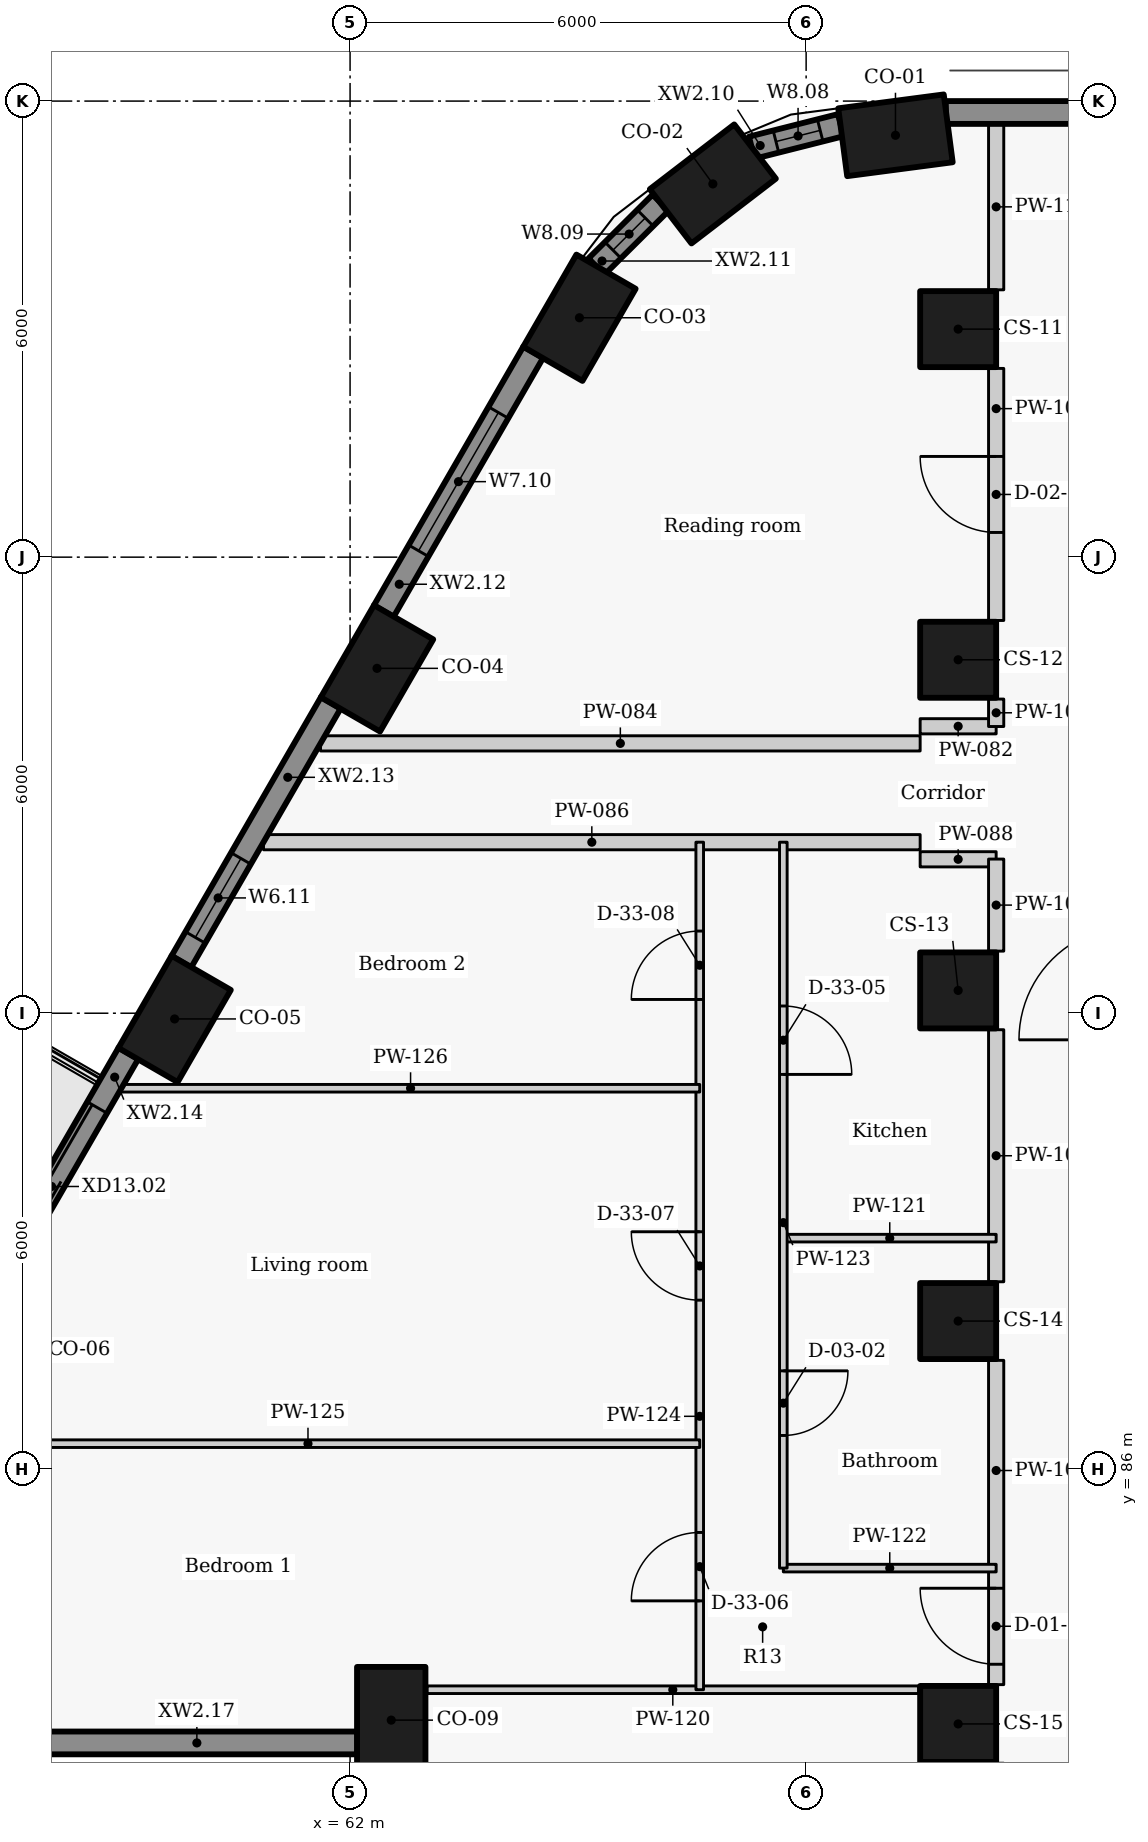
"""IFC4 building model, lengths in metres.
Left out: names, types, materials, properties, quantities, classifications, styles, units other than length and angle.
Written with IfcOpenShell. Run it as: python <this file> out.ifc"""

import sys

from ifc_helpers import new_model, si_unit, direction, frame, frame_2d, origin, origin_2d, place, context, subcontext, project, spatial, rectangle, extrude, element, fill, save


model = new_model("IFC4")
c1 = context("Model", 3, precision=1e-05, world=origin(), true_north=direction((0.0, 1.0)))
c2 = subcontext(c1, "Body", "Model", "MODEL_VIEW")
j1 = project(units=[si_unit("LENGTHUNIT", "METRE"), si_unit("PLANEANGLEUNIT", "RADIAN")], contexts=[c1])
p1 = place(None, origin())
s1 = spatial("IfcSite", under=j1, at=p1, CompositionType="ELEMENT")
p2 = place(p1, origin())
s2 = spatial("IfcBuilding", under=s1, at=p2, CompositionType="ELEMENT")
p3 = place(p2, frame((0.0, 0.0, 117.3)))
s3 = spatial("IfcBuildingStorey", under=s2, at=p3, CompositionType="ELEMENT", Elevation=117.3)
for number, where, z_axis, x_axis in (
    (1, (69.175, 103.55, 0.0), (0.0, 0.0, 1.0), (-0.991, -0.131, 0.0)),
    (2, (66.773, 102.91, 0.0), (0.0, 0.0, 1.0), (-0.793, -0.609, 0.0)),
    (3, (65.018, 101.149, 0.0), (0.0, 0.0, 1.0), (-0.5, -0.866, 0.0)),
    (4, (62.354, 96.537, 0.0), (0.0, 0.0, 1.0), (-0.5, -0.866, 0.0)),
    (5, (59.692, 91.925, 0.0), (0.0, 0.0, 1.0), (-0.5, -0.866, 0.0)),
    (6, (62.542, 82.7, 0.0), (0.0, 0.0, 1.0), (0.0, -1.0, 0.0)),
):
    element("IfcColumn", number, at=place(p3, frame(where, z_axis=z_axis, x_axis=x_axis)), inside=s3, PredefinedType="COLUMN", context=c2, shape_type="SweptSolid", body=[
        extrude(rectangle(XDim=1.4, YDim=0.9, at=origin_2d()), origin(), (0.0, 0.0, 1.0), 3.3),
    ])
for number, where, z_axis, x_axis in (
    (7, (70.0, 101.0, 0.0), (0.0, 0.0, 1.0), (0.0, -1.0, 0.0)),
    (8, (70.0, 96.65, 0.0), (0.0, 0.0, 1.0), (0.0, -1.0, 0.0)),
    (9, (70.0, 92.3, 0.0), (0.0, 0.0, 1.0), (0.0, -1.0, 0.0)),
    (10, (70.0, 87.95, 0.0), (0.0, 0.0, 1.0), (0.0, -1.0, 0.0)),
    (11, (70.0, 82.65, 0.0), (0.0, 0.0, 1.0), (0.0, -1.0, 0.0)),
):
    element("IfcColumn", number, at=place(p3, frame(where, z_axis=z_axis, x_axis=x_axis)), inside=s3, PredefinedType="COLUMN", context=c2, shape_type="SweptSolid", body=[
        extrude(rectangle(XDim=1.0, YDim=1.0, at=origin_2d()), origin(), (0.0, 0.0, 1.0), 3.3),
    ])
p4 = place(p3, frame((90.129, 103.85, 0.0), z_axis=(0.0, 0.0, 1.0), x_axis=(-1.0, 0.0, 0.0)))
e12 = element("IfcWall", 12, at=p4, inside=s3, PredefinedType="SOLIDWALL", context=c2, shape_type="SweptSolid", body=[
    extrude(rectangle(XDim=20.291, YDim=0.3, at=frame_2d((10.146, 0.0))), origin(), (0.0, 0.0, 1.0), 2.05),
])
p5 = place(p3, frame((68.456, 103.683, 0.0), z_axis=(0.0, 0.0, 1.0), x_axis=(-0.969485113966, -0.245150186208, 0.0)))
e13 = element("IfcWall", 13, at=p5, inside=s3, PredefinedType="SOLIDWALL", context=c2, shape_type="SweptSolid", body=[
    extrude(rectangle(XDim=1.208, YDim=0.3, at=frame_2d((0.604, 0.0))), origin(), (0.0, 0.0, 1.0), 2.05),
])
p6 = place(p5, frame((0.28, 0.0, 0.9)))
e14 = element("IfcOpeningElement", 14, at=p6, cuts=e13, PredefinedType="OPENING", context=c2, shape_type="SweptSolid", body=[
    extrude(rectangle(XDim=0.6, YDim=1.1, at=frame_2d((0.3, 0.55))), frame((0.0, 0.16, 0.0), z_axis=(0.0, -1.0, 0.0), x_axis=(1.0, 0.0, 0.0)), (0.0, 0.0, 1.0), 0.32),
])
p7 = place(p3, frame((66.085, 102.663, 0.0), z_axis=(0.0, 0.0, 1.0), x_axis=(-0.708951665509, -0.705257070842, 0.0)))
e15 = element("IfcWall", 15, at=p7, inside=s3, PredefinedType="SOLIDWALL", context=c2, shape_type="SweptSolid", body=[
    extrude(rectangle(XDim=1.189, YDim=0.3, at=frame_2d((0.595, 0.0))), origin(), (0.0, 0.0, 1.0), 2.05),
])
p8 = place(p7, frame((0.284, 0.0, 0.9)))
e16 = element("IfcOpeningElement", 16, at=p8, cuts=e15, PredefinedType="OPENING", context=c2, shape_type="SweptSolid", body=[
    extrude(rectangle(XDim=0.6, YDim=1.1, at=frame_2d((0.3, 0.55))), frame((0.0, 0.16, 0.0), z_axis=(0.0, -1.0, 0.0), x_axis=(1.0, 0.0, 0.0)), (0.0, 0.0, 1.0), 0.32),
])
p9 = place(p3, frame((64.41, 100.697, 0.0), z_axis=(0.0, 0.0, 1.0), x_axis=(-0.500003583557, -0.866023334807, 0.0)))
e17 = element("IfcWall", 17, at=p9, inside=s3, PredefinedType="SOLIDWALL", context=c2, shape_type="SweptSolid", body=[
    extrude(rectangle(XDim=3.934, YDim=0.3, at=frame_2d((1.967, 0.0))), origin(), (0.0, 0.0, 1.0), 2.05),
])
p10 = place(p9, frame((0.917, 0.0, 0.9)))
e18 = element("IfcOpeningElement", 18, at=p10, cuts=e17, PredefinedType="OPENING", context=c2, shape_type="SweptSolid", body=[
    extrude(rectangle(XDim=2.1, YDim=1.1, at=frame_2d((1.05, 0.55))), frame((0.0, 0.16, 0.0), z_axis=(0.0, -1.0, 0.0), x_axis=(1.0, 0.0, 0.0)), (0.0, 0.0, 1.0), 0.32),
])
p11 = place(p3, frame((61.747, 96.084, 0.0), z_axis=(0.0, 0.0, 1.0), x_axis=(-0.499957037901, -0.866050206543, 0.0)))
e19 = element("IfcWall", 19, at=p11, inside=s3, PredefinedType="SOLIDWALL", context=c2, shape_type="SweptSolid", body=[
    extrude(rectangle(XDim=3.934, YDim=0.3, at=frame_2d((1.967, 0.0))), origin(), (0.0, 0.0, 1.0), 2.05),
])
p12 = place(p11, frame((2.365, 0.0, 0.9)))
e20 = element("IfcOpeningElement", 20, at=p12, cuts=e19, PredefinedType="OPENING", context=c2, shape_type="SweptSolid", body=[
    extrude(rectangle(XDim=1.2, YDim=1.1, at=frame_2d((0.6, 0.55))), frame((0.0, 0.16, 0.0), z_axis=(0.0, -1.0, 0.0), x_axis=(1.0, 0.0, 0.0)), (0.0, 0.0, 1.0), 0.32),
])
p13 = place(p3, frame((59.084, 91.472, 0.0), z_axis=(0.0, 0.0, 1.0), x_axis=(-0.500009139881, -0.866020126807, 0.0)))
e21 = element("IfcWall", 21, at=p13, inside=s3, PredefinedType="SOLIDWALL", context=c2, shape_type="SweptSolid", body=[
    extrude(rectangle(XDim=3.637, YDim=0.3, at=frame_2d((1.818, 0.0))), origin(), (0.0, 0.0, 1.0), 2.05),
])
p14 = place(p13, frame((0.823, 0.0, 0.0)))
e22 = element("IfcOpeningElement", 22, at=p14, cuts=e21, PredefinedType="OPENING", context=c2, shape_type="SweptSolid", body=[
    extrude(rectangle(XDim=2.4, YDim=2.0, at=frame_2d((1.2, 1.0))), frame((0.0, 0.16, 0.0), z_axis=(0.0, -1.0, 0.0), x_axis=(1.0, 0.0, 0.0)), (0.0, 0.0, 1.0), 0.32),
])
p15 = place(p3, frame((57.873, 82.4, 0.0), z_axis=(0.0, 0.0, 1.0), x_axis=(1.0, 0.0, 0.0)))
e23 = element("IfcWall", 23, at=p15, inside=s3, PredefinedType="SOLIDWALL", context=c2, shape_type="SweptSolid", body=[
    extrude(rectangle(XDim=4.223, YDim=0.3, at=frame_2d((2.111, 0.0))), origin(), (0.0, 0.0, 1.0), 2.05),
])
p16 = place(p3, frame((69.5, 95.775, 0.0), z_axis=(0.0, 0.0, 1.0), x_axis=(1.0, 0.0, 0.0)))
e24 = element("IfcWall", 24, at=p16, inside=s3, PredefinedType="PARTITIONING", context=c2, shape_type="SweptSolid", body=[
    extrude(rectangle(XDim=1.0, YDim=0.2, at=frame_2d((0.5, 0.0))), origin(), (0.0, 0.0, 1.0), 2.43),
])
p17 = place(p3, frame((61.611, 95.55, 0.0), z_axis=(0.0, 0.0, 1.0), x_axis=(1.0, 0.0, 0.0)))
e25 = element("IfcWall", 25, at=p17, inside=s3, PredefinedType="PARTITIONING", context=c2, shape_type="SweptSolid", body=[
    extrude(rectangle(XDim=7.889, YDim=0.2, at=frame_2d((3.944, 0.0))), origin(), (0.0, 0.0, 1.0), 2.03),
])
p18 = place(p3, frame((60.861, 94.25, 0.0), z_axis=(0.0, 0.0, 1.0), x_axis=(1.0, 0.0, 0.0)))
e26 = element("IfcWall", 26, at=p18, inside=s3, PredefinedType="PARTITIONING", context=c2, shape_type="SweptSolid", body=[
    extrude(rectangle(XDim=8.639, YDim=0.2, at=frame_2d((4.32, 0.0))), origin(), (0.0, 0.0, 1.0), 2.03),
])
p19 = place(p3, frame((69.5, 94.025, 0.0), z_axis=(0.0, 0.0, 1.0), x_axis=(1.0, 0.0, 0.0)))
e27 = element("IfcWall", 27, at=p19, inside=s3, PredefinedType="PARTITIONING", context=c2, shape_type="SweptSolid", body=[
    extrude(rectangle(XDim=1.0, YDim=0.2, at=frame_2d((0.5, 0.0))), origin(), (0.0, 0.0, 1.0), 2.43),
])
p20 = place(p3, frame((70.5, 83.167, 0.0), z_axis=(0.0, 0.0, 1.0), x_axis=(0.0, 1.0, 0.0)))
e28 = element("IfcWall", 28, at=p20, inside=s3, PredefinedType="PARTITIONING", context=c2, shape_type="SweptSolid", body=[
    extrude(rectangle(XDim=4.266, YDim=0.2, at=frame_2d((2.133, 0.0))), origin(), (0.0, 0.0, 1.0), 2.95),
])
p21 = place(p20, frame((0.268, 0.0, 0.0)))
e29 = element("IfcOpeningElement", 29, at=p21, cuts=e28, PredefinedType="OPENING", context=c2, shape_type="SweptSolid", body=[
    extrude(rectangle(XDim=1.0, YDim=2.1, at=frame_2d((0.5, 1.05))), frame((0.0, 0.11, 0.0), z_axis=(0.0, -1.0, 0.0), x_axis=(1.0, 0.0, 0.0)), (0.0, 0.0, 1.0), 0.22),
])
p22 = place(p3, frame((70.5, 88.467, 0.0), z_axis=(0.0, 0.0, 1.0), x_axis=(0.0, 1.0, 0.0)))
e30 = element("IfcWall", 30, at=p22, inside=s3, PredefinedType="PARTITIONING", context=c2, shape_type="SweptSolid", body=[
    extrude(rectangle(XDim=3.316, YDim=0.2, at=frame_2d((1.658, 0.0))), origin(), (0.0, 0.0, 1.0), 2.95),
])
p23 = place(p3, frame((70.5, 92.817, 0.0), z_axis=(0.0, 0.0, 1.0), x_axis=(0.0, 1.0, 0.0)))
e31 = element("IfcWall", 31, at=p23, inside=s3, PredefinedType="PARTITIONING", context=c2, shape_type="SweptSolid", body=[
    extrude(rectangle(XDim=1.211, YDim=0.2, at=frame_2d((0.605, 0.0))), origin(), (0.0, 0.0, 1.0), 2.95),
])
p24 = place(p3, frame((70.5, 95.772, 0.0), z_axis=(0.0, 0.0, 1.0), x_axis=(0.0, 1.0, 0.0)))
e32 = element("IfcWall", 32, at=p24, inside=s3, PredefinedType="PARTITIONING", context=c2, shape_type="SweptSolid", body=[
    extrude(rectangle(XDim=0.361, YDim=0.2, at=frame_2d((0.181, 0.0))), origin(), (0.0, 0.0, 1.0), 2.95),
])
p25 = place(p3, frame((70.5, 97.167, 0.0), z_axis=(0.0, 0.0, 1.0), x_axis=(0.0, 1.0, 0.0)))
e33 = element("IfcWall", 33, at=p25, inside=s3, PredefinedType="PARTITIONING", context=c2, shape_type="SweptSolid", body=[
    extrude(rectangle(XDim=3.316, YDim=0.2, at=frame_2d((1.658, 0.0))), origin(), (0.0, 0.0, 1.0), 2.95),
])
p26 = place(p25, frame((1.158, 0.0, 0.0)))
e34 = element("IfcOpeningElement", 34, at=p26, cuts=e33, PredefinedType="OPENING", context=c2, shape_type="SweptSolid", body=[
    extrude(rectangle(XDim=1.0, YDim=2.1, at=frame_2d((0.5, 1.05))), frame((0.0, 0.11, 0.0), z_axis=(0.0, -1.0, 0.0), x_axis=(1.0, 0.0, 0.0)), (0.0, 0.0, 1.0), 0.22),
])
p27 = place(p3, frame((70.5, 101.517, 0.0), z_axis=(0.0, 0.0, 1.0), x_axis=(0.0, 1.0, 0.0)))
e35 = element("IfcWall", 35, at=p27, inside=s3, PredefinedType="PARTITIONING", context=c2, shape_type="SweptSolid", body=[
    extrude(rectangle(XDim=2.183, YDim=0.2, at=frame_2d((1.091, 0.0))), origin(), (0.0, 0.0, 1.0), 2.95),
])
p28 = place(p3, frame((63.012, 83.1, 0.0), z_axis=(0.0, 0.0, 1.0), x_axis=(1.0, 0.0, 0.0)))
e36 = element("IfcWall", 36, at=p28, inside=s3, PredefinedType="PARTITIONING", context=c2, shape_type="SweptSolid", body=[
    extrude(rectangle(XDim=6.468, YDim=0.1, at=frame_2d((3.234, 0.0))), origin(), (0.0, 0.0, 1.0), 2.95),
])
for number, where, z_axis, x_axis in (
    (37, (67.7, 89.041, 0.0), (0.0, 0.0, 1.0), (1.0, 0.0, 0.0)),
    (38, (67.7, 84.7, 0.0), (0.0, 0.0, 1.0), (1.0, 0.0, 0.0)),
):
    element("IfcWall", number, at=place(p3, frame(where, z_axis=z_axis, x_axis=x_axis)), inside=s3, PredefinedType="PARTITIONING", context=c2, shape_type="SweptSolid", body=[
        extrude(rectangle(XDim=2.8, YDim=0.1, at=frame_2d((1.4, 0.0))), origin(), (0.0, 0.0, 1.0), 2.43),
    ])
p29 = place(p3, frame((67.7, 94.25, 0.0), z_axis=(0.0, 0.0, 1.0), x_axis=(0.0, -1.0, 0.0)))
e39 = element("IfcWall", 39, at=p29, inside=s3, PredefinedType="PARTITIONING", context=c2, shape_type="SweptSolid", body=[
    extrude(rectangle(XDim=9.55, YDim=0.1, at=frame_2d((4.775, 0.0))), origin(), (0.0, 0.0, 1.0), 2.95),
])
p30 = place(p29, frame((6.955, 0.0, 0.0)))
e40 = element("IfcOpeningElement", 40, at=p30, cuts=e39, PredefinedType="OPENING", context=c2, shape_type="SweptSolid", body=[
    extrude(rectangle(XDim=0.85, YDim=2.1, at=frame_2d((0.425, 1.05))), frame((0.0, 0.06, 0.0), z_axis=(0.0, -1.0, 0.0), x_axis=(1.0, 0.0, 0.0)), (0.0, 0.0, 1.0), 0.12),
])
p31 = place(p29, frame((2.155, 0.0, 0.0)))
e41 = element("IfcOpeningElement", 41, at=p31, cuts=e39, PredefinedType="OPENING", context=c2, shape_type="SweptSolid", body=[
    extrude(rectangle(XDim=0.9, YDim=2.1, at=frame_2d((0.45, 1.05))), frame((0.0, 0.06, 0.0), z_axis=(0.0, -1.0, 0.0), x_axis=(1.0, 0.0, 0.0)), (0.0, 0.0, 1.0), 0.12),
])
p32 = place(p3, frame((66.6, 83.1, 0.0), z_axis=(0.0, 0.0, 1.0), x_axis=(0.0, 1.0, 0.0)))
e42 = element("IfcWall", 42, at=p32, inside=s3, PredefinedType="PARTITIONING", context=c2, shape_type="SweptSolid", body=[
    extrude(rectangle(XDim=11.15, YDim=0.1, at=frame_2d((5.575, 0.0))), origin(), (0.0, 0.0, 1.0), 2.95),
])
p33 = place(p32, frame((1.169, 0.0, 0.0)))
e43 = element("IfcOpeningElement", 43, at=p33, cuts=e42, PredefinedType="OPENING", context=c2, shape_type="SweptSolid", body=[
    extrude(rectangle(XDim=0.9, YDim=2.1, at=frame_2d((0.45, 1.05))), frame((0.0, 0.06, 0.0), z_axis=(0.0, -1.0, 0.0), x_axis=(1.0, 0.0, 0.0)), (0.0, 0.0, 1.0), 0.12),
])
p34 = place(p32, frame((5.125, 0.0, 0.0)))
e44 = element("IfcOpeningElement", 44, at=p34, cuts=e42, PredefinedType="OPENING", context=c2, shape_type="SweptSolid", body=[
    extrude(rectangle(XDim=0.9, YDim=2.1, at=frame_2d((0.45, 1.05))), frame((0.0, 0.06, 0.0), z_axis=(0.0, -1.0, 0.0), x_axis=(1.0, 0.0, 0.0)), (0.0, 0.0, 1.0), 0.12),
])
p35 = place(p32, frame((9.081, 0.0, 0.0)))
e45 = element("IfcOpeningElement", 45, at=p35, cuts=e42, PredefinedType="OPENING", context=c2, shape_type="SweptSolid", body=[
    extrude(rectangle(XDim=0.9, YDim=2.1, at=frame_2d((0.45, 1.05))), frame((0.0, 0.06, 0.0), z_axis=(0.0, -1.0, 0.0), x_axis=(1.0, 0.0, 0.0)), (0.0, 0.0, 1.0), 0.12),
])
p36 = place(p3, frame((56.292, 86.337, 0.0), z_axis=(0.0, 0.0, 1.0), x_axis=(1.0, 0.0, 0.0)))
e46 = element("IfcWall", 46, at=p36, inside=s3, PredefinedType="PARTITIONING", context=c2, shape_type="SweptSolid", body=[
    extrude(rectangle(XDim=10.308, YDim=0.1, at=frame_2d((5.154, 0.0))), origin(), (0.0, 0.0, 1.0), 2.03),
])
p37 = place(p3, frame((58.992, 91.013, 0.0), z_axis=(0.0, 0.0, 1.0), x_axis=(1.0, 0.0, 0.0)))
e47 = element("IfcWall", 47, at=p37, inside=s3, PredefinedType="PARTITIONING", context=c2, shape_type="SweptSolid", body=[
    extrude(rectangle(XDim=7.608, YDim=0.1, at=frame_2d((3.804, 0.0))), origin(), (0.0, 0.0, 1.0), 2.03),
])
p38 = place(p6, origin())
e48 = element("IfcWindow", 48, at=p38, inside=s3, PartitioningType="SINGLE_PANEL", PredefinedType="WINDOW", context=c2, shape_type="SweptSolid", body=[
    extrude(rectangle(XDim=0.6, YDim=1.1, at=frame_2d((0.3, 0.55))), frame((0.0, 0.03, 0.0), z_axis=(0.0, -1.0, 0.0), x_axis=(1.0, 0.0, 0.0)), (0.0, 0.0, 1.0), 0.06),
])
fill(e14, e48)
p39 = place(p8, origin())
e49 = element("IfcWindow", 49, at=p39, inside=s3, PartitioningType="SINGLE_PANEL", PredefinedType="WINDOW", context=c2, shape_type="SweptSolid", body=[
    extrude(rectangle(XDim=0.6, YDim=1.1, at=frame_2d((0.3, 0.55))), frame((0.0, 0.03, 0.0), z_axis=(0.0, -1.0, 0.0), x_axis=(1.0, 0.0, 0.0)), (0.0, 0.0, 1.0), 0.06),
])
fill(e16, e49)
p40 = place(p10, origin())
e50 = element("IfcWindow", 50, at=p40, inside=s3, PartitioningType="SINGLE_PANEL", PredefinedType="WINDOW", context=c2, shape_type="SweptSolid", body=[
    extrude(rectangle(XDim=2.1, YDim=1.1, at=frame_2d((1.05, 0.55))), frame((0.0, 0.03, 0.0), z_axis=(0.0, -1.0, 0.0), x_axis=(1.0, 0.0, 0.0)), (0.0, 0.0, 1.0), 0.06),
])
fill(e18, e50)
p41 = place(p12, origin())
e51 = element("IfcWindow", 51, at=p41, inside=s3, PartitioningType="SINGLE_PANEL", PredefinedType="WINDOW", context=c2, shape_type="SweptSolid", body=[
    extrude(rectangle(XDim=1.2, YDim=1.1, at=frame_2d((0.6, 0.55))), frame((0.0, 0.03, 0.0), z_axis=(0.0, -1.0, 0.0), x_axis=(1.0, 0.0, 0.0)), (0.0, 0.0, 1.0), 0.06),
])
fill(e20, e51)
p42 = place(p14, origin())
e52 = element("IfcDoor", 52, at=p42, inside=s3, OperationType="DOUBLE_DOOR_SLIDING", PredefinedType="DOOR", context=c2, shape_type="SweptSolid", body=[
    extrude(rectangle(XDim=2.4, YDim=2.0, at=frame_2d((1.2, 1.0))), frame((0.0, 0.025, 0.0), z_axis=(0.0, -1.0, 0.0), x_axis=(1.0, 0.0, 0.0)), (0.0, 0.0, 1.0), 0.05),
])
fill(e22, e52)
p43 = place(p21, origin())
e53 = element("IfcDoor", 53, at=p43, inside=s3, OperationType="SINGLE_SWING_RIGHT", PredefinedType="DOOR", context=c2, shape_type="SweptSolid", body=[
    extrude(rectangle(XDim=1.0, YDim=2.1, at=frame_2d((0.5, 1.05))), frame((0.0, 0.025, 0.0), z_axis=(0.0, -1.0, 0.0), x_axis=(1.0, 0.0, 0.0)), (0.0, 0.0, 1.0), 0.05),
])
fill(e29, e53)
p44 = place(p30, origin())
e54 = element("IfcDoor", 54, at=p44, inside=s3, OperationType="SINGLE_SWING_LEFT", PredefinedType="DOOR", context=c2, shape_type="SweptSolid", body=[
    extrude(rectangle(XDim=0.85, YDim=2.1, at=frame_2d((0.425, 1.05))), frame((0.0, 0.025, 0.0), z_axis=(0.0, -1.0, 0.0), x_axis=(1.0, 0.0, 0.0)), (0.0, 0.0, 1.0), 0.05),
])
fill(e40, e54)
p45 = place(p31, origin())
e55 = element("IfcDoor", 55, at=p45, inside=s3, OperationType="SINGLE_SWING_RIGHT", PredefinedType="DOOR", context=c2, shape_type="SweptSolid", body=[
    extrude(rectangle(XDim=0.9, YDim=2.1, at=frame_2d((0.45, 1.05))), frame((0.0, 0.025, 0.0), z_axis=(0.0, -1.0, 0.0), x_axis=(1.0, 0.0, 0.0)), (0.0, 0.0, 1.0), 0.05),
])
fill(e41, e55)
p46 = place(p33, origin())
e56 = element("IfcDoor", 56, at=p46, inside=s3, OperationType="SINGLE_SWING_LEFT", PredefinedType="DOOR", context=c2, shape_type="SweptSolid", body=[
    extrude(rectangle(XDim=0.9, YDim=2.1, at=frame_2d((0.45, 1.05))), frame((0.0, 0.025, 0.0), z_axis=(0.0, -1.0, 0.0), x_axis=(1.0, 0.0, 0.0)), (0.0, 0.0, 1.0), 0.05),
])
fill(e43, e56)
p47 = place(p34, origin())
e57 = element("IfcDoor", 57, at=p47, inside=s3, OperationType="SINGLE_SWING_RIGHT", PredefinedType="DOOR", context=c2, shape_type="SweptSolid", body=[
    extrude(rectangle(XDim=0.9, YDim=2.1, at=frame_2d((0.45, 1.05))), frame((0.0, 0.025, 0.0), z_axis=(0.0, -1.0, 0.0), x_axis=(1.0, 0.0, 0.0)), (0.0, 0.0, 1.0), 0.05),
])
fill(e44, e57)
p48 = place(p35, origin())
e58 = element("IfcDoor", 58, at=p48, inside=s3, OperationType="SINGLE_SWING_LEFT", PredefinedType="DOOR", context=c2, shape_type="SweptSolid", body=[
    extrude(rectangle(XDim=0.9, YDim=2.1, at=frame_2d((0.45, 1.05))), frame((0.0, 0.025, 0.0), z_axis=(0.0, -1.0, 0.0), x_axis=(1.0, 0.0, 0.0)), (0.0, 0.0, 1.0), 0.05),
])
fill(e45, e58)
p49 = place(p26, origin())
e59 = element("IfcDoor", 59, at=p49, inside=s3, OperationType="SINGLE_SWING_RIGHT", PredefinedType="DOOR", context=c2, shape_type="SweptSolid", body=[
    extrude(rectangle(XDim=1.0, YDim=2.1, at=frame_2d((0.5, 1.05))), frame((0.0, 0.025, 0.0), z_axis=(0.0, -1.0, 0.0), x_axis=(1.0, 0.0, 0.0)), (0.0, 0.0, 1.0), 0.05),
])
fill(e34, e59)
save(model, sys.argv[1])
